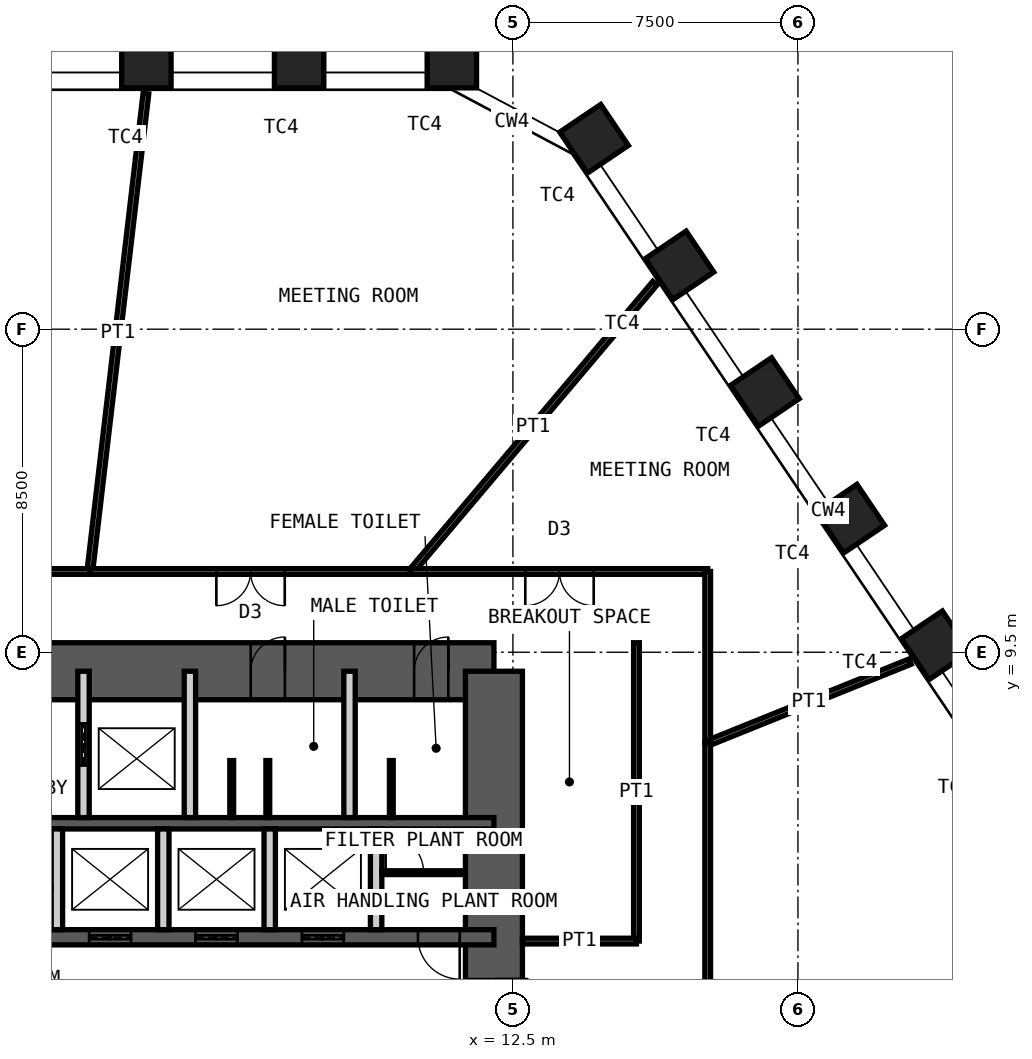
"""IFC4 building model, lengths in metres.
Left out: names, types, materials, properties, quantities, classifications, styles, units other than length and angle.
Written with IfcOpenShell. Run it as: python <this file> out.ifc"""

import sys

from ifc_helpers import new_model, si_unit, direction, frame, frame_2d, origin, origin_2d, place, context, subcontext, project, spatial, rectangle, hollow_rectangle, extrude, element, fill, save


model = new_model("IFC4")
c1 = context("Model", 3, precision=1e-05, world=origin(), true_north=direction((0.0, 1.0)))
c2 = subcontext(c1, "Body", "Model", "MODEL_VIEW")
j1 = project(units=[si_unit("LENGTHUNIT", "METRE"), si_unit("PLANEANGLEUNIT", "RADIAN")], contexts=[c1])
p1 = place(None, origin())
s1 = spatial("IfcSite", under=j1, at=p1, CompositionType="ELEMENT")
p2 = place(p1, origin())
s2 = spatial("IfcBuilding", under=s1, at=p2, CompositionType="ELEMENT")
p3 = place(p2, frame((0.0, 0.0, 166.0)))
s3 = spatial("IfcBuildingStorey", under=s2, at=p3, CompositionType="ELEMENT", Elevation=166.0)
for number, where, z_axis, x_axis in (
    (1, (2.854, 25.0, 0.0), (0.0, 0.0, 1.0), (-1.0, 0.0, 0.0)),
    (2, (6.874, 25.0, 0.0), (0.0, 0.0, 1.0), (-1.0, 0.0, 0.0)),
    (3, (10.893, 25.0, 0.0), (0.0, 0.0, 1.0), (-1.0, 0.0, 0.0)),
    (4, (14.635, 23.01, 0.0), (0.0, 0.0, 1.0), (-0.559, 0.829, 0.0)),
    (5, (16.882, 19.678, 0.0), (0.0, 0.0, 1.0), (-0.559, 0.829, 0.0)),
    (6, (19.13, 16.346, 0.0), (0.0, 0.0, 1.0), (-0.559, 0.829, 0.0)),
    (7, (21.377, 13.014, 0.0), (0.0, 0.0, 1.0), (-0.559, 0.829, 0.0)),
    (8, (23.625, 9.682, 0.0), (0.0, 0.0, 1.0), (-0.559, 0.829, 0.0)),
):
    element("IfcColumn", number, at=place(p3, frame(where, z_axis=z_axis, x_axis=x_axis)), inside=s3, PredefinedType="COLUMN", context=c2, shape_type="SweptSolid", body=[
        extrude(hollow_rectangle(XDim=1.3, YDim=1.3, WallThickness=0.1, at=origin_2d()), origin(), (0.0, 0.0, 1.0), 4.2),
    ])
p4 = place(p3, frame((-12.0, 9.0, 0.0), z_axis=(0.0, 0.0, 1.0), x_axis=(1.0, 0.0, 0.0)))
e9 = element("IfcWall", 9, at=p4, inside=s3, PredefinedType="SHEAR", context=c2, shape_type="SweptSolid", body=[
    extrude(rectangle(XDim=24.0, YDim=1.5, at=frame_2d((12.0, 0.0))), origin(), (0.0, 0.0, 1.0), 4.2),
])
p5 = place(p4, frame((10.4, 0.0, 0.0)))
e10 = element("IfcOpeningElement", 10, at=p5, cuts=e9, PredefinedType="OPENING", context=c2, shape_type="SweptSolid", body=[
    extrude(rectangle(XDim=1.0, YDim=2.1, at=frame_2d((0.5, 1.05))), frame((0.0, 0.76, 0.0), z_axis=(0.0, -1.0, 0.0), x_axis=(1.0, 0.0, 0.0)), (0.0, 0.0, 1.0), 1.52),
])
p6 = place(p4, frame((17.6, 0.0, 0.0)))
e11 = element("IfcOpeningElement", 11, at=p6, cuts=e9, PredefinedType="OPENING", context=c2, shape_type="SweptSolid", body=[
    extrude(rectangle(XDim=0.9, YDim=2.1, at=frame_2d((0.45, 1.05))), frame((0.0, 0.76, 0.0), z_axis=(0.0, -1.0, 0.0), x_axis=(1.0, 0.0, 0.0)), (0.0, 0.0, 1.0), 1.52),
])
p7 = place(p4, frame((21.9, 0.0, 0.0)))
e12 = element("IfcOpeningElement", 12, at=p7, cuts=e9, PredefinedType="OPENING", context=c2, shape_type="SweptSolid", body=[
    extrude(rectangle(XDim=0.9, YDim=2.1, at=frame_2d((0.45, 1.05))), frame((0.0, 0.76, 0.0), z_axis=(0.0, -1.0, 0.0), x_axis=(1.0, 0.0, 0.0)), (0.0, 0.0, 1.0), 1.52),
])
p8 = place(p3, frame((12.0, -9.0, 0.0), z_axis=(0.0, 0.0, 1.0), x_axis=(0.0, 1.0, 0.0)))
e13 = element("IfcWall", 13, at=p8, inside=s3, PredefinedType="SHEAR", context=c2, shape_type="SweptSolid", body=[
    extrude(rectangle(XDim=18.0, YDim=1.5, at=frame_2d((9.0, 0.0))), origin(), (0.0, 0.0, 1.0), 4.2),
])
p9 = place(p8, frame((8.1, 0.0, 0.0)))
e14 = element("IfcOpeningElement", 14, at=p9, cuts=e13, PredefinedType="OPENING", context=c2, shape_type="SweptSolid", body=[
    extrude(rectangle(XDim=1.8, YDim=2.1, at=frame_2d((0.9, 1.05))), frame((0.0, 0.76, 0.0), z_axis=(0.0, -1.0, 0.0), x_axis=(1.0, 0.0, 0.0)), (0.0, 0.0, 1.0), 1.52),
])
p10 = place(p3, frame((-12.0, 5.0, 0.0), z_axis=(0.0, 0.0, 1.0), x_axis=(1.0, 0.0, 0.0)))
e15 = element("IfcWall", 15, at=p10, inside=s3, PredefinedType="SHEAR", context=c2, shape_type="SweptSolid", body=[
    extrude(rectangle(XDim=24.0, YDim=0.3, at=frame_2d((12.0, 0.0))), origin(), (0.0, 0.0, 1.0), 4.2),
])
p11 = place(p3, frame((-12.0, 2.0, 0.0), z_axis=(0.0, 0.0, 1.0), x_axis=(1.0, 0.0, 0.0)))
e16 = element("IfcWall", 16, at=p11, inside=s3, PredefinedType="SHEAR", context=c2, shape_type="SweptSolid", body=[
    extrude(rectangle(XDim=24.0, YDim=0.4, at=frame_2d((12.0, 0.0))), origin(), (0.0, 0.0, 1.0), 4.2),
])
p12 = place(p11, frame((2.4, 0.0, 0.0)))
e17 = element("IfcOpeningElement", 17, at=p12, cuts=e16, PredefinedType="OPENING", context=c2, shape_type="SweptSolid", body=[
    extrude(rectangle(XDim=1.1, YDim=2.1, at=frame_2d((0.55, 1.05))), frame((0.0, 0.21, 0.0), z_axis=(0.0, -1.0, 0.0), x_axis=(1.0, 0.0, 0.0)), (0.0, 0.0, 1.0), 0.42),
])
p13 = place(p11, frame((22.0, 0.0, 0.0)))
e18 = element("IfcOpeningElement", 18, at=p13, cuts=e16, PredefinedType="OPENING", context=c2, shape_type="SweptSolid", body=[
    extrude(rectangle(XDim=1.1, YDim=2.1, at=frame_2d((0.55, 1.05))), frame((0.0, 0.21, 0.0), z_axis=(0.0, -1.0, 0.0), x_axis=(1.0, 0.0, 0.0)), (0.0, 0.0, 1.0), 0.42),
])
p14 = place(p11, frame((10.15, 0.0, 0.0)))
e19 = element("IfcOpeningElement", 19, at=p14, cuts=e16, PredefinedType="OPENING", context=c2, shape_type="SweptSolid", body=[
    extrude(rectangle(XDim=1.0, YDim=2.1, at=frame_2d((0.5, 1.05))), frame((0.0, 0.21, 0.0), z_axis=(0.0, -1.0, 0.0), x_axis=(1.0, 0.0, 0.0)), (0.0, 0.0, 1.0), 0.42),
])
p15 = place(p11, frame((6.9, 0.0, 0.0)))
e20 = element("IfcOpeningElement", 20, at=p15, cuts=e16, PredefinedType="OPENING", context=c2, shape_type="SweptSolid", body=[
    extrude(rectangle(XDim=1.0, YDim=2.1, at=frame_2d((0.5, 1.05))), frame((0.0, 0.21, 0.0), z_axis=(0.0, -1.0, 0.0), x_axis=(1.0, 0.0, 0.0)), (0.0, 0.0, 1.0), 0.42),
])
p16 = place(p11, frame((13.35, 0.0, 0.0)))
e21 = element("IfcOpeningElement", 21, at=p16, cuts=e16, PredefinedType="OPENING", context=c2, shape_type="SweptSolid", body=[
    extrude(rectangle(XDim=1.1, YDim=2.4, at=frame_2d((0.55, 1.2))), frame((0.0, 0.21, 0.0), z_axis=(0.0, -1.0, 0.0), x_axis=(1.0, 0.0, 0.0)), (0.0, 0.0, 1.0), 0.42),
])
p17 = place(p11, frame((16.15, 0.0, 0.0)))
e22 = element("IfcOpeningElement", 22, at=p17, cuts=e16, PredefinedType="OPENING", context=c2, shape_type="SweptSolid", body=[
    extrude(rectangle(XDim=1.1, YDim=2.4, at=frame_2d((0.55, 1.2))), frame((0.0, 0.21, 0.0), z_axis=(0.0, -1.0, 0.0), x_axis=(1.0, 0.0, 0.0)), (0.0, 0.0, 1.0), 0.42),
])
p18 = place(p11, frame((18.95, 0.0, 0.0)))
e23 = element("IfcOpeningElement", 23, at=p18, cuts=e16, PredefinedType="OPENING", context=c2, shape_type="SweptSolid", body=[
    extrude(rectangle(XDim=1.1, YDim=2.4, at=frame_2d((0.55, 1.2))), frame((0.0, 0.21, 0.0), z_axis=(0.0, -1.0, 0.0), x_axis=(1.0, 0.0, 0.0)), (0.0, 0.0, 1.0), 0.42),
])
p19 = place(p3, frame((1.2, 5.15, 0.0), z_axis=(0.0, 0.0, 1.0), x_axis=(0.0, 1.0, 0.0)))
e24 = element("IfcWall", 24, at=p19, inside=s3, PredefinedType="PARTITIONING", context=c2, shape_type="SweptSolid", body=[
    extrude(rectangle(XDim=3.85, YDim=0.3, at=frame_2d((1.925, 0.0))), origin(), (0.0, 0.0, 1.0), 3.98),
])
p20 = place(p19, frame((1.375, 0.0, 0.0)))
e25 = element("IfcOpeningElement", 25, at=p20, cuts=e24, PredefinedType="OPENING", context=c2, shape_type="SweptSolid", body=[
    extrude(rectangle(XDim=1.1, YDim=2.4, at=frame_2d((0.55, 1.2))), frame((0.0, 0.16, 0.0), z_axis=(0.0, -1.0, 0.0), x_axis=(1.0, 0.0, 0.0)), (0.0, 0.0, 1.0), 0.32),
])
for number, where, z_axis, x_axis in (
    (26, (4.0, 5.15, 0.0), (0.0, 0.0, 1.0), (0.0, 1.0, 0.0)),
    (27, (8.2, 5.15, 0.0), (0.0, 0.0, 1.0), (0.0, 1.0, 0.0)),
):
    element("IfcWall", number, at=place(p3, frame(where, z_axis=z_axis, x_axis=x_axis)), inside=s3, PredefinedType="PARTITIONING", context=c2, shape_type="SweptSolid", body=[
        extrude(rectangle(XDim=3.85, YDim=0.3, at=frame_2d((1.925, 0.0))), origin(), (0.0, 0.0, 1.0), 3.98),
    ])
for number, where, z_axis, x_axis in (
    (28, (0.5, 2.2, 0.0), (0.0, 0.0, 1.0), (0.0, 1.0, 0.0)),
    (29, (3.3, 2.2, 0.0), (0.0, 0.0, 1.0), (0.0, 1.0, 0.0)),
    (30, (6.1, 2.2, 0.0), (0.0, 0.0, 1.0), (0.0, 1.0, 0.0)),
    (31, (8.9, 2.2, 0.0), (0.0, 0.0, 1.0), (0.0, 1.0, 0.0)),
):
    element("IfcWall", number, at=place(p3, frame(where, z_axis=z_axis, x_axis=x_axis)), inside=s3, PredefinedType="PARTITIONING", context=c2, shape_type="SweptSolid", body=[
        extrude(rectangle(XDim=2.65, YDim=0.3, at=frame_2d((1.325, 0.0))), origin(), (0.0, 0.0, 1.0), 3.98),
    ])
p21 = place(p3, frame((9.05, 3.7, 0.0), z_axis=(0.0, 0.0, 1.0), x_axis=(1.0, 0.0, 0.0)))
e32 = element("IfcWall", 32, at=p21, inside=s3, PredefinedType="PARTITIONING", context=c2, shape_type="SweptSolid", body=[
    extrude(rectangle(XDim=2.2, YDim=0.1, at=frame_2d((1.1, 0.0))), origin(), (0.0, 0.0, 1.0), 3.98),
])
p22 = place(p21, frame((0.1, 0.0, 0.0)))
e33 = element("IfcOpeningElement", 33, at=p22, cuts=e32, PredefinedType="OPENING", context=c2, shape_type="SweptSolid", body=[
    extrude(rectangle(XDim=1.0, YDim=2.4, at=frame_2d((0.5, 1.2))), frame((0.0, 0.06, 0.0), z_axis=(0.0, -1.0, 0.0), x_axis=(1.0, 0.0, 0.0)), (0.0, 0.0, 1.0), 0.12),
])
for number, where, z_axis, x_axis in (
    (34, (5.1, 5.15, 0.0), (0.0, 0.0, 1.0), (0.0, 1.0, 0.0)),
    (35, (6.05, 5.15, 0.0), (0.0, 0.0, 1.0), (0.0, 1.0, 0.0)),
    (36, (9.3, 5.15, 0.0), (0.0, 0.0, 1.0), (0.0, 1.0, 0.0)),
):
    element("IfcWall", number, at=place(p3, frame(where, z_axis=z_axis, x_axis=x_axis)), inside=s3, PredefinedType="PARTITIONING", context=c2, shape_type="SweptSolid", body=[
        extrude(rectangle(XDim=1.5, YDim=0.1, at=frame_2d((0.75, 0.0))), origin(), (0.0, 0.0, 1.0), 2.1),
    ])
p23 = place(p3, frame((2.843, 24.201, 0.0), z_axis=(0.0, 0.0, 1.0), x_axis=(-0.116670084723, -0.993170726175, 0.0)))
e37 = element("IfcWall", 37, at=p23, inside=s3, PredefinedType="PARTITIONING", context=c2, shape_type="SweptSolid", body=[
    extrude(rectangle(XDim=12.662, YDim=0.15, at=frame_2d((6.331, 0.0))), origin(), (0.0, 0.0, 1.0), 2.93),
])
p24 = place(p3, frame((1.366, 11.625, 0.0), z_axis=(0.0, 0.0, 1.0), x_axis=(1.0, 0.0, 0.0)))
e38 = element("IfcWall", 38, at=p24, inside=s3, PredefinedType="PARTITIONING", context=c2, shape_type="SweptSolid", body=[
    extrude(rectangle(XDim=8.46, YDim=0.15, at=frame_2d((4.23, 0.0))), origin(), (0.0, 0.0, 1.0), 4.03),
])
p25 = place(p24, frame((3.33, 0.0, 0.0)))
e39 = element("IfcOpeningElement", 39, at=p25, cuts=e38, PredefinedType="OPENING", context=c2, shape_type="SweptSolid", body=[
    extrude(rectangle(XDim=1.8, YDim=2.4, at=frame_2d((0.9, 1.2))), frame((0.0, 0.085, 0.0), z_axis=(0.0, -1.0, 0.0), x_axis=(1.0, 0.0, 0.0)), (0.0, 0.0, 1.0), 0.17),
])
p26 = place(p3, frame((16.237, 19.21, 0.0), z_axis=(0.0, 0.0, 1.0), x_axis=(-0.645526723652, -0.763737683404, 0.0)))
e40 = element("IfcWall", 40, at=p26, inside=s3, PredefinedType="PARTITIONING", context=c2, shape_type="SweptSolid", body=[
    extrude(rectangle(XDim=9.932, YDim=0.15, at=frame_2d((4.966, 0.0))), origin(), (0.0, 0.0, 1.0), 2.93),
])
p27 = place(p3, frame((9.826, 11.625, 0.0), z_axis=(0.0, 0.0, 1.0), x_axis=(1.0, 0.0, 0.0)))
e41 = element("IfcWall", 41, at=p27, inside=s3, PredefinedType="PARTITIONING", context=c2, shape_type="SweptSolid", body=[
    extrude(rectangle(XDim=7.799, YDim=0.15, at=frame_2d((3.899, 0.0))), origin(), (0.0, 0.0, 1.0), 4.03),
])
p28 = place(p27, frame((3.0, 0.0, 0.0)))
e42 = element("IfcOpeningElement", 42, at=p28, cuts=e41, PredefinedType="OPENING", context=c2, shape_type="SweptSolid", body=[
    extrude(rectangle(XDim=1.8, YDim=2.4, at=frame_2d((0.9, 1.2))), frame((0.0, 0.085, 0.0), z_axis=(0.0, -1.0, 0.0), x_axis=(1.0, 0.0, 0.0)), (0.0, 0.0, 1.0), 0.17),
])
p29 = place(p3, frame((17.625, 11.625, 0.0), z_axis=(0.0, 0.0, 1.0), x_axis=(0.0, -1.0, 0.0)))
e43 = element("IfcWall", 43, at=p29, inside=s3, PredefinedType="PARTITIONING", context=c2, shape_type="SweptSolid", body=[
    extrude(rectangle(XDim=4.519, YDim=0.15, at=frame_2d((2.26, 0.0))), origin(), (0.0, 0.0, 1.0), 4.03),
])
p30 = place(p3, frame((22.951, 9.254, 0.0), z_axis=(0.0, 0.0, 1.0), x_axis=(-0.927444087873, -0.373961848147, 0.0)))
e44 = element("IfcWall", 44, at=p30, inside=s3, PredefinedType="PARTITIONING", context=c2, shape_type="SweptSolid", body=[
    extrude(rectangle(XDim=5.743, YDim=0.15, at=frame_2d((2.872, 0.0))), origin(), (0.0, 0.0, 1.0), 2.93),
])
p31 = place(p3, frame((17.625, 7.106, 0.0), z_axis=(0.0, 0.0, 1.0), x_axis=(0.0, -1.0, 0.0)))
e45 = element("IfcWall", 45, at=p31, inside=s3, PredefinedType="PARTITIONING", context=c2, shape_type="SweptSolid", body=[
    extrude(rectangle(XDim=18.731, YDim=0.15, at=frame_2d((9.365, 0.0))), origin(), (0.0, 0.0, 1.0), 4.03),
])
p32 = place(p31, frame((8.466, 0.0, 0.0)))
e46 = element("IfcOpeningElement", 46, at=p32, cuts=e45, PredefinedType="OPENING", context=c2, shape_type="SweptSolid", body=[
    extrude(rectangle(XDim=1.8, YDim=2.4, at=frame_2d((0.9, 1.2))), frame((0.0, 0.085, 0.0), z_axis=(0.0, -1.0, 0.0), x_axis=(1.0, 0.0, 0.0)), (0.0, 0.0, 1.0), 0.17),
])
p33 = place(p3, frame((-4.403, 11.625, 0.0), z_axis=(0.0, 0.0, 1.0), x_axis=(1.0, 0.0, 0.0)))
e47 = element("IfcWall", 47, at=p33, inside=s3, PredefinedType="PARTITIONING", context=c2, shape_type="SweptSolid", body=[
    extrude(rectangle(XDim=5.768, YDim=0.15, at=frame_2d((2.884, 0.0))), origin(), (0.0, 0.0, 1.0), 4.03),
])
p34 = place(p33, frame((1.984, 0.0, 0.0)))
e48 = element("IfcOpeningElement", 48, at=p34, cuts=e47, PredefinedType="OPENING", context=c2, shape_type="SweptSolid", body=[
    extrude(rectangle(XDim=1.8, YDim=2.4, at=frame_2d((0.9, 1.2))), frame((0.0, 0.085, 0.0), z_axis=(0.0, -1.0, 0.0), x_axis=(1.0, 0.0, 0.0)), (0.0, 0.0, 1.0), 0.17),
])
p35 = place(p3, frame((15.75, 1.9, 0.0), z_axis=(0.0, 0.0, 1.0), x_axis=(0.0, 1.0, 0.0)))
e49 = element("IfcWall", 49, at=p35, inside=s3, PredefinedType="PARTITIONING", context=c2, shape_type="SweptSolid", body=[
    extrude(rectangle(XDim=7.85, YDim=0.15, at=frame_2d((3.925, 0.0))), origin(), (0.0, 0.0, 1.0), 4.03),
])
p36 = place(p3, frame((12.75, 1.9, 0.0), z_axis=(0.0, 0.0, 1.0), x_axis=(1.0, 0.0, 0.0)))
e50 = element("IfcWall", 50, at=p36, inside=s3, PredefinedType="PARTITIONING", context=c2, shape_type="SweptSolid", body=[
    extrude(rectangle(XDim=3.0, YDim=0.15, at=frame_2d((1.5, 0.0))), origin(), (0.0, 0.0, 1.0), 3.03),
])
p37 = place(p6, origin())
e51 = element("IfcDoor", 51, at=p37, inside=s3, OperationType="SINGLE_SWING_LEFT", PredefinedType="DOOR", context=c2, shape_type="SweptSolid", body=[
    extrude(rectangle(XDim=0.9, YDim=2.1, at=frame_2d((0.45, 1.05))), frame((0.0, 0.025, 0.0), z_axis=(0.0, -1.0, 0.0), x_axis=(1.0, 0.0, 0.0)), (0.0, 0.0, 1.0), 0.05),
])
fill(e11, e51)
p38 = place(p7, origin())
e52 = element("IfcDoor", 52, at=p38, inside=s3, OperationType="SINGLE_SWING_LEFT", PredefinedType="DOOR", context=c2, shape_type="SweptSolid", body=[
    extrude(rectangle(XDim=0.9, YDim=2.1, at=frame_2d((0.45, 1.05))), frame((0.0, 0.025, 0.0), z_axis=(0.0, -1.0, 0.0), x_axis=(1.0, 0.0, 0.0)), (0.0, 0.0, 1.0), 0.05),
])
fill(e12, e52)
p39 = place(p13, origin())
e53 = element("IfcDoor", 53, at=p39, inside=s3, OperationType="SINGLE_SWING_RIGHT", PredefinedType="DOOR", context=c2, shape_type="SweptSolid", body=[
    extrude(rectangle(XDim=1.1, YDim=2.1, at=frame_2d((0.55, 1.05))), frame((0.0, 0.025, 0.0), z_axis=(0.0, -1.0, 0.0), x_axis=(1.0, 0.0, 0.0)), (0.0, 0.0, 1.0), 0.05),
])
fill(e18, e53)
p40 = place(p9, origin())
e54 = element("IfcDoor", 54, at=p40, inside=s3, OperationType="DOUBLE_DOOR_DOUBLE_SWING", PredefinedType="DOOR", context=c2, shape_type="SweptSolid", body=[
    extrude(rectangle(XDim=1.8, YDim=2.1, at=frame_2d((0.9, 1.05))), frame((0.0, 0.025, 0.0), z_axis=(0.0, -1.0, 0.0), x_axis=(1.0, 0.0, 0.0)), (0.0, 0.0, 1.0), 0.05),
])
fill(e14, e54)
p41 = place(p20, origin())
e55 = element("IfcDoor", 55, at=p41, inside=s3, OperationType="DOUBLE_DOOR_SLIDING", PredefinedType="DOOR", context=c2, shape_type="SweptSolid", body=[
    extrude(rectangle(XDim=1.1, YDim=2.4, at=frame_2d((0.55, 1.2))), frame((0.0, 0.025, 0.0), z_axis=(0.0, -1.0, 0.0), x_axis=(1.0, 0.0, 0.0)), (0.0, 0.0, 1.0), 0.05),
])
fill(e25, e55)
p42 = place(p16, origin())
e56 = element("IfcDoor", 56, at=p42, inside=s3, OperationType="DOUBLE_DOOR_SLIDING", PredefinedType="DOOR", context=c2, shape_type="SweptSolid", body=[
    extrude(rectangle(XDim=1.1, YDim=2.4, at=frame_2d((0.55, 1.2))), frame((0.0, 0.025, 0.0), z_axis=(0.0, -1.0, 0.0), x_axis=(1.0, 0.0, 0.0)), (0.0, 0.0, 1.0), 0.05),
])
fill(e21, e56)
p43 = place(p17, origin())
e57 = element("IfcDoor", 57, at=p43, inside=s3, OperationType="DOUBLE_DOOR_SLIDING", PredefinedType="DOOR", context=c2, shape_type="SweptSolid", body=[
    extrude(rectangle(XDim=1.1, YDim=2.4, at=frame_2d((0.55, 1.2))), frame((0.0, 0.025, 0.0), z_axis=(0.0, -1.0, 0.0), x_axis=(1.0, 0.0, 0.0)), (0.0, 0.0, 1.0), 0.05),
])
fill(e22, e57)
p44 = place(p18, origin())
e58 = element("IfcDoor", 58, at=p44, inside=s3, OperationType="DOUBLE_DOOR_SLIDING", PredefinedType="DOOR", context=c2, shape_type="SweptSolid", body=[
    extrude(rectangle(XDim=1.1, YDim=2.4, at=frame_2d((0.55, 1.2))), frame((0.0, 0.025, 0.0), z_axis=(0.0, -1.0, 0.0), x_axis=(1.0, 0.0, 0.0)), (0.0, 0.0, 1.0), 0.05),
])
fill(e23, e58)
p45 = place(p22, origin())
e59 = element("IfcDoor", 59, at=p45, inside=s3, OperationType="SINGLE_SWING_RIGHT", PredefinedType="DOOR", context=c2, shape_type="SweptSolid", body=[
    extrude(rectangle(XDim=1.0, YDim=2.4, at=frame_2d((0.5, 1.2))), frame((0.0, 0.025, 0.0), z_axis=(0.0, -1.0, 0.0), x_axis=(1.0, 0.0, 0.0)), (0.0, 0.0, 1.0), 0.05),
])
fill(e33, e59)
p46 = place(p25, origin())
e60 = element("IfcDoor", 60, at=p46, inside=s3, OperationType="DOUBLE_DOOR_DOUBLE_SWING", PredefinedType="DOOR", context=c2, shape_type="SweptSolid", body=[
    extrude(rectangle(XDim=1.8, YDim=2.4, at=frame_2d((0.9, 1.2))), frame((0.0, 0.025, 0.0), z_axis=(0.0, -1.0, 0.0), x_axis=(1.0, 0.0, 0.0)), (0.0, 0.0, 1.0), 0.05),
])
fill(e39, e60)
p47 = place(p28, origin())
e61 = element("IfcDoor", 61, at=p47, inside=s3, OperationType="DOUBLE_DOOR_DOUBLE_SWING", PredefinedType="DOOR", context=c2, shape_type="SweptSolid", body=[
    extrude(rectangle(XDim=1.8, YDim=2.4, at=frame_2d((0.9, 1.2))), frame((0.0, 0.025, 0.0), z_axis=(0.0, -1.0, 0.0), x_axis=(1.0, 0.0, 0.0)), (0.0, 0.0, 1.0), 0.05),
])
fill(e42, e61)
save(model, sys.argv[1])
